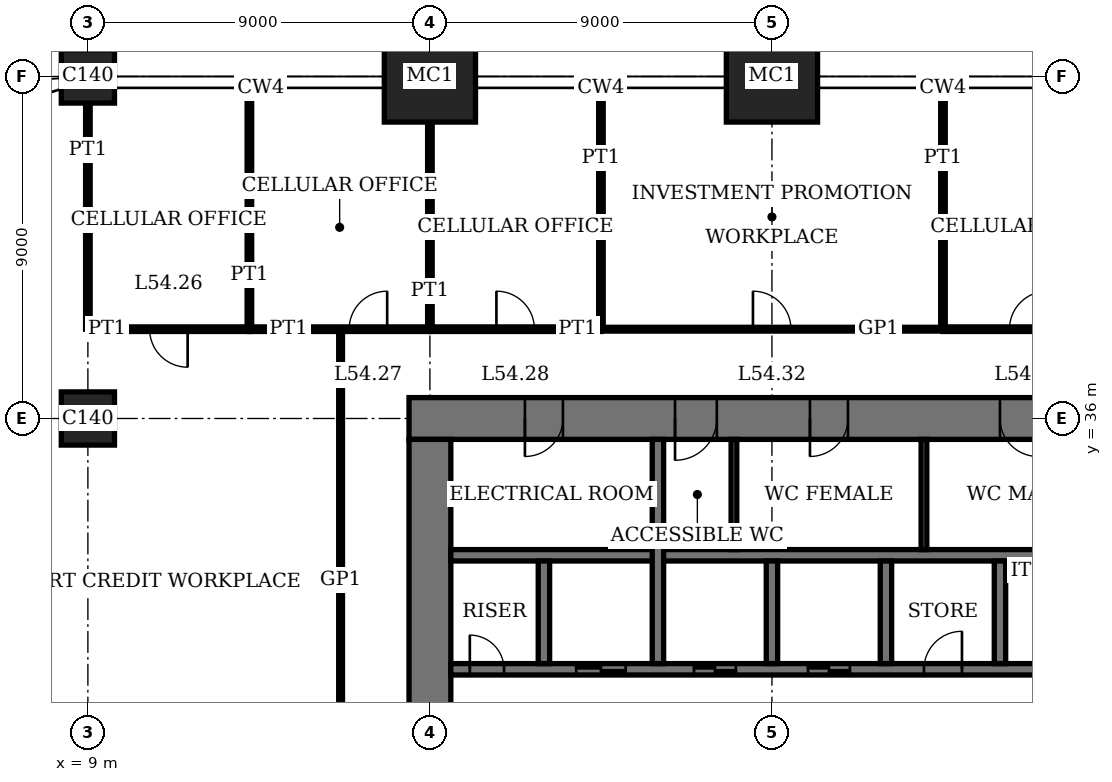
"""IFC4 building model, lengths in metres.
Left out: names, types, materials, properties, quantities, classifications, styles, units other than length and angle.
Written with IfcOpenShell. Run it as: python <this file> out.ifc"""

import sys

from ifc_helpers import new_model, si_unit, direction, frame, frame_2d, origin, origin_2d, place, context, subcontext, project, spatial, rectangle, extrude, element, fill, save


model = new_model("IFC4")
c1 = context("Model", 3, precision=1e-05, world=origin(), true_north=direction((0.0, 1.0)))
c2 = subcontext(c1, "Body", "Model", "MODEL_VIEW")
j1 = project(units=[si_unit("LENGTHUNIT", "METRE"), si_unit("PLANEANGLEUNIT", "RADIAN")], contexts=[c1])
p1 = place(None, origin())
s1 = spatial("IfcSite", under=j1, at=p1, CompositionType="ELEMENT")
p2 = place(p1, origin())
s2 = spatial("IfcBuilding", under=s1, at=p2, CompositionType="ELEMENT")
p3 = place(p2, frame((0.0, 0.0, 222.2)))
s3 = spatial("IfcBuildingStorey", under=s2, at=p3, CompositionType="ELEMENT", Elevation=222.2)
for number, where, z_axis, x_axis in (
    (1, (9.0, 36.0, 0.0), (0.0, 0.0, 1.0), (1.0, 0.0, 0.0)),
    (2, (9.0, 45.0, 0.0), (0.0, 0.0, 1.0), (1.0, 0.0, 0.0)),
):
    element("IfcColumn", number, at=place(p3, frame(where, z_axis=z_axis, x_axis=x_axis)), inside=s3, PredefinedType="COLUMN", context=c2, shape_type="SweptSolid", body=[
        extrude(rectangle(XDim=1.4, YDim=1.4, at=origin_2d()), origin(), (0.0, 0.0, 1.0), 4.0),
    ])
for number, where, z_axis, x_axis in (
    (3, (18.0, 45.0, 0.0), (0.0, 0.0, 1.0), (1.0, 0.0, 0.0)),
    (4, (27.0, 45.0, 0.0), (0.0, 0.0, 1.0), (1.0, 0.0, 0.0)),
):
    element("IfcColumn", number, at=place(p3, frame(where, z_axis=z_axis, x_axis=x_axis)), inside=s3, PredefinedType="COLUMN", context=c2, shape_type="SweptSolid", body=[
        extrude(rectangle(XDim=2.4, YDim=2.4, at=origin_2d()), origin(), (0.0, 0.0, 1.0), 4.0),
    ])
p4 = place(p3, frame((45.55, 36.0, 0.0), z_axis=(0.0, 0.0, 1.0), x_axis=(-1.0, 0.0, 0.0)))
e5 = element("IfcWall", 5, at=p4, inside=s3, PredefinedType="SHEAR", context=c2, shape_type="SweptSolid", body=[
    extrude(rectangle(XDim=28.1, YDim=1.1, at=frame_2d((14.05, 0.0))), origin(), (0.0, 0.0, 1.0), 4.0),
])
p5 = place(p4, frame((11.55, 0.0, 0.0)))
e6 = element("IfcOpeningElement", 6, at=p5, cuts=e5, PredefinedType="OPENING", context=c2, shape_type="SweptSolid", body=[
    extrude(rectangle(XDim=1.0, YDim=2.4, at=frame_2d((0.5, 1.2))), frame((0.0, 0.56, 0.0), z_axis=(0.0, -1.0, 0.0), x_axis=(1.0, 0.0, 0.0)), (0.0, 0.0, 1.0), 1.12),
])
p6 = place(p4, frame((16.55, 0.0, 0.0)))
e7 = element("IfcOpeningElement", 7, at=p6, cuts=e5, PredefinedType="OPENING", context=c2, shape_type="SweptSolid", body=[
    extrude(rectangle(XDim=1.0, YDim=2.4, at=frame_2d((0.5, 1.2))), frame((0.0, 0.56, 0.0), z_axis=(0.0, -1.0, 0.0), x_axis=(1.0, 0.0, 0.0)), (0.0, 0.0, 1.0), 1.12),
])
p7 = place(p4, frame((20.0, 0.0, 0.0)))
e8 = element("IfcOpeningElement", 8, at=p7, cuts=e5, PredefinedType="OPENING", context=c2, shape_type="SweptSolid", body=[
    extrude(rectangle(XDim=1.1, YDim=2.4, at=frame_2d((0.55, 1.2))), frame((0.0, 0.56, 0.0), z_axis=(0.0, -1.0, 0.0), x_axis=(1.0, 0.0, 0.0)), (0.0, 0.0, 1.0), 1.12),
])
p8 = place(p4, frame((24.05, 0.0, 0.0)))
e9 = element("IfcOpeningElement", 9, at=p8, cuts=e5, PredefinedType="OPENING", context=c2, shape_type="SweptSolid", body=[
    extrude(rectangle(XDim=1.0, YDim=2.4, at=frame_2d((0.5, 1.2))), frame((0.0, 0.56, 0.0), z_axis=(0.0, -1.0, 0.0), x_axis=(1.0, 0.0, 0.0)), (0.0, 0.0, 1.0), 1.12),
])
p9 = place(p3, frame((18.0, 35.45, 0.0), z_axis=(0.0, 0.0, 1.0), x_axis=(0.0, -1.0, 0.0)))
e10 = element("IfcWall", 10, at=p9, inside=s3, PredefinedType="SHEAR", context=c2, shape_type="SweptSolid", body=[
    extrude(rectangle(XDim=16.9, YDim=1.1, at=frame_2d((8.45, 0.0))), origin(), (0.0, 0.0, 1.0), 4.0),
])
p10 = place(p9, frame((8.45, 0.0, 0.0)))
e11 = element("IfcOpeningElement", 11, at=p10, cuts=e10, PredefinedType="OPENING", context=c2, shape_type="SweptSolid", body=[
    extrude(rectangle(XDim=1.8, YDim=2.4, at=frame_2d((0.9, 1.2))), frame((0.0, 0.56, 0.0), z_axis=(0.0, -1.0, 0.0), x_axis=(1.0, 0.0, 0.0)), (0.0, 0.0, 1.0), 1.12),
])
p11 = place(p3, frame((18.55, 29.4, 0.0), z_axis=(0.0, 0.0, 1.0), x_axis=(1.0, 0.0, 0.0)))
e12 = element("IfcWall", 12, at=p11, inside=s3, PredefinedType="SHEAR", context=c2, shape_type="SweptSolid", body=[
    extrude(rectangle(XDim=25.9, YDim=0.3, at=frame_2d((12.95, 0.0))), origin(), (0.0, 0.0, 1.0), 4.0),
])
p12 = place(p11, frame((19.95, 0.0, 0.0)))
e13 = element("IfcOpeningElement", 13, at=p12, cuts=e12, PredefinedType="OPENING", context=c2, shape_type="SweptSolid", body=[
    extrude(rectangle(XDim=1.0, YDim=2.4, at=frame_2d((0.5, 1.2))), frame((0.0, 0.16, 0.0), z_axis=(0.0, -1.0, 0.0), x_axis=(1.0, 0.0, 0.0)), (0.0, 0.0, 1.0), 0.32),
])
p13 = place(p11, frame((0.5, 0.0, 0.0)))
e14 = element("IfcOpeningElement", 14, at=p13, cuts=e12, PredefinedType="OPENING", context=c2, shape_type="SweptSolid", body=[
    extrude(rectangle(XDim=0.9, YDim=2.1, at=frame_2d((0.45, 1.05))), frame((0.0, 0.16, 0.0), z_axis=(0.0, -1.0, 0.0), x_axis=(1.0, 0.0, 0.0)), (0.0, 0.0, 1.0), 0.32),
])
p14 = place(p11, frame((15.45, 0.0, 0.0)))
e15 = element("IfcOpeningElement", 15, at=p14, cuts=e12, PredefinedType="OPENING", context=c2, shape_type="SweptSolid", body=[
    extrude(rectangle(XDim=1.0, YDim=2.4, at=frame_2d((0.5, 1.2))), frame((0.0, 0.16, 0.0), z_axis=(0.0, -1.0, 0.0), x_axis=(1.0, 0.0, 0.0)), (0.0, 0.0, 1.0), 0.32),
])
p15 = place(p11, frame((12.45, 0.0, 0.0)))
e16 = element("IfcOpeningElement", 16, at=p15, cuts=e12, PredefinedType="OPENING", context=c2, shape_type="SweptSolid", body=[
    extrude(rectangle(XDim=1.0, YDim=2.4, at=frame_2d((0.5, 1.2))), frame((0.0, 0.16, 0.0), z_axis=(0.0, -1.0, 0.0), x_axis=(1.0, 0.0, 0.0)), (0.0, 0.0, 1.0), 0.32),
])
p16 = place(p11, frame((9.4, 0.0, 0.0)))
e17 = element("IfcOpeningElement", 17, at=p16, cuts=e12, PredefinedType="OPENING", context=c2, shape_type="SweptSolid", body=[
    extrude(rectangle(XDim=1.1, YDim=2.4, at=frame_2d((0.55, 1.2))), frame((0.0, 0.16, 0.0), z_axis=(0.0, -1.0, 0.0), x_axis=(1.0, 0.0, 0.0)), (0.0, 0.0, 1.0), 0.32),
])
p17 = place(p11, frame((6.4, 0.0, 0.0)))
e18 = element("IfcOpeningElement", 18, at=p17, cuts=e12, PredefinedType="OPENING", context=c2, shape_type="SweptSolid", body=[
    extrude(rectangle(XDim=1.1, YDim=2.4, at=frame_2d((0.55, 1.2))), frame((0.0, 0.16, 0.0), z_axis=(0.0, -1.0, 0.0), x_axis=(1.0, 0.0, 0.0)), (0.0, 0.0, 1.0), 0.32),
])
p18 = place(p11, frame((3.3, 0.0, 0.0)))
e19 = element("IfcOpeningElement", 19, at=p18, cuts=e12, PredefinedType="OPENING", context=c2, shape_type="SweptSolid", body=[
    extrude(rectangle(XDim=1.3, YDim=2.4, at=frame_2d((0.65, 1.2))), frame((0.0, 0.16, 0.0), z_axis=(0.0, -1.0, 0.0), x_axis=(1.0, 0.0, 0.0)), (0.0, 0.0, 1.0), 0.32),
])
p19 = place(p3, frame((18.55, 32.4, 0.0), z_axis=(0.0, 0.0, 1.0), x_axis=(1.0, 0.0, 0.0)))
e20 = element("IfcWall", 20, at=p19, inside=s3, PredefinedType="SHEAR", context=c2, shape_type="SweptSolid", body=[
    extrude(rectangle(XDim=17.3, YDim=0.3, at=frame_2d((8.65, 0.0))), origin(), (0.0, 0.0, 1.0), 4.0),
])
for number, where, z_axis, x_axis in (
    (21, (33.0, 29.55, 0.0), (0.0, 0.0, 1.0), (0.0, 1.0, 0.0)),
    (22, (30.0, 29.55, 0.0), (0.0, 0.0, 1.0), (0.0, 1.0, 0.0)),
    (23, (27.0, 29.55, 0.0), (0.0, 0.0, 1.0), (0.0, 1.0, 0.0)),
):
    element("IfcWall", number, at=place(p3, frame(where, z_axis=z_axis, x_axis=x_axis)), inside=s3, PredefinedType="SHEAR", context=c2, shape_type="SweptSolid", body=[
        extrude(rectangle(XDim=2.7, YDim=0.3, at=frame_2d((1.35, 0.0))), origin(), (0.0, 0.0, 1.0), 4.0),
    ])
p20 = place(p3, frame((24.0, 29.55, 0.0), z_axis=(0.0, 0.0, 1.0), x_axis=(0.0, 1.0, 0.0)))
e24 = element("IfcWall", 24, at=p20, inside=s3, PredefinedType="SHEAR", context=c2, shape_type="SweptSolid", body=[
    extrude(rectangle(XDim=5.9, YDim=0.3, at=frame_2d((2.95, 0.0))), origin(), (0.0, 0.0, 1.0), 4.0),
])
p21 = place(p3, frame((21.0, 29.55, 0.0), z_axis=(0.0, 0.0, 1.0), x_axis=(0.0, 1.0, 0.0)))
e25 = element("IfcWall", 25, at=p21, inside=s3, PredefinedType="SHEAR", context=c2, shape_type="SweptSolid", body=[
    extrude(rectangle(XDim=2.7, YDim=0.3, at=frame_2d((1.35, 0.0))), origin(), (0.0, 0.0, 1.0), 4.0),
])
p22 = place(p3, frame((9.0, 38.35, 0.0), z_axis=(0.0, 0.0, 1.0), x_axis=(1.0, 0.0, 0.0)))
e26 = element("IfcWall", 26, at=p22, inside=s3, PredefinedType="PARTITIONING", context=c2, shape_type="SweptSolid", body=[
    extrude(rectangle(XDim=4.25, YDim=0.12, at=frame_2d((2.125, 0.0))), origin(), (0.0, 0.0, 1.0), 3.75),
])
p23 = place(p22, frame((1.625, 0.0, 0.0)))
e27 = element("IfcOpeningElement", 27, at=p23, cuts=e26, PredefinedType="OPENING", context=c2, shape_type="SweptSolid", body=[
    extrude(rectangle(XDim=1.0, YDim=2.4, at=frame_2d((0.5, 1.2))), frame((0.0, 0.07, 0.0), z_axis=(0.0, -1.0, 0.0), x_axis=(1.0, 0.0, 0.0)), (0.0, 0.0, 1.0), 0.14),
])
p24 = place(p3, frame((13.25, 38.35, 0.0), z_axis=(0.0, 0.0, 1.0), x_axis=(1.0, 0.0, 0.0)))
e28 = element("IfcWall", 28, at=p24, inside=s3, PredefinedType="PARTITIONING", context=c2, shape_type="SweptSolid", body=[
    extrude(rectangle(XDim=4.75, YDim=0.12, at=frame_2d((2.375, 0.0))), origin(), (0.0, 0.0, 1.0), 3.75),
])
p25 = place(p24, frame((2.625, 0.0, 0.0)))
e29 = element("IfcOpeningElement", 29, at=p25, cuts=e28, PredefinedType="OPENING", context=c2, shape_type="SweptSolid", body=[
    extrude(rectangle(XDim=1.0, YDim=2.4, at=frame_2d((0.5, 1.2))), frame((0.0, 0.07, 0.0), z_axis=(0.0, -1.0, 0.0), x_axis=(1.0, 0.0, 0.0)), (0.0, 0.0, 1.0), 0.14),
])
p26 = place(p3, frame((18.0, 38.35, 0.0), z_axis=(0.0, 0.0, 1.0), x_axis=(1.0, 0.0, 0.0)))
e30 = element("IfcWall", 30, at=p26, inside=s3, PredefinedType="PARTITIONING", context=c2, shape_type="SweptSolid", body=[
    extrude(rectangle(XDim=4.5, YDim=0.12, at=frame_2d((2.25, 0.0))), origin(), (0.0, 0.0, 1.0), 3.75),
])
p27 = place(p26, frame((1.75, 0.0, 0.0)))
e31 = element("IfcOpeningElement", 31, at=p27, cuts=e30, PredefinedType="OPENING", context=c2, shape_type="SweptSolid", body=[
    extrude(rectangle(XDim=1.0, YDim=2.4, at=frame_2d((0.5, 1.2))), frame((0.0, 0.07, 0.0), z_axis=(0.0, -1.0, 0.0), x_axis=(1.0, 0.0, 0.0)), (0.0, 0.0, 1.0), 0.14),
])
p28 = place(p3, frame((31.5, 38.35, 0.0), z_axis=(0.0, 0.0, 1.0), x_axis=(1.0, 0.0, 0.0)))
e32 = element("IfcWall", 32, at=p28, inside=s3, PredefinedType="PARTITIONING", context=c2, shape_type="SweptSolid", body=[
    extrude(rectangle(XDim=4.5, YDim=0.12, at=frame_2d((2.25, 0.0))), origin(), (0.0, 0.0, 1.0), 3.75),
])
p29 = place(p28, frame((1.75, 0.0, 0.0)))
e33 = element("IfcOpeningElement", 33, at=p29, cuts=e32, PredefinedType="OPENING", context=c2, shape_type="SweptSolid", body=[
    extrude(rectangle(XDim=1.0, YDim=2.4, at=frame_2d((0.5, 1.2))), frame((0.0, 0.07, 0.0), z_axis=(0.0, -1.0, 0.0), x_axis=(1.0, 0.0, 0.0)), (0.0, 0.0, 1.0), 0.14),
])
p30 = place(p3, frame((22.5, 38.35, 0.0), z_axis=(0.0, 0.0, 1.0), x_axis=(1.0, 0.0, 0.0)))
e34 = element("IfcWall", 34, at=p30, inside=s3, PredefinedType="PARTITIONING", context=c2, shape_type="SweptSolid", body=[
    extrude(rectangle(XDim=9.0, YDim=0.1, at=frame_2d((4.5, 0.0))), origin(), (0.0, 0.0, 1.0), 3.75),
])
p31 = place(p30, frame((4.0, 0.0, 0.0)))
e35 = element("IfcOpeningElement", 35, at=p31, cuts=e34, PredefinedType="OPENING", context=c2, shape_type="SweptSolid", body=[
    extrude(rectangle(XDim=1.0, YDim=2.4, at=frame_2d((0.5, 1.2))), frame((0.0, 0.06, 0.0), z_axis=(0.0, -1.0, 0.0), x_axis=(1.0, 0.0, 0.0)), (0.0, 0.0, 1.0), 0.12),
])
p32 = place(p3, frame((9.0, 38.35, 0.0), z_axis=(0.0, 0.0, 1.0), x_axis=(0.0, 1.0, 0.0)))
e36 = element("IfcWall", 36, at=p32, inside=s3, PredefinedType="PARTITIONING", context=c2, shape_type="SweptSolid", body=[
    extrude(rectangle(XDim=5.95, YDim=0.12, at=frame_2d((2.975, 0.0))), origin(), (0.0, 0.0, 1.0), 3.05),
])
p33 = place(p3, frame((13.25, 38.35, 0.0), z_axis=(0.0, 0.0, 1.0), x_axis=(0.0, 1.0, 0.0)))
e37 = element("IfcWall", 37, at=p33, inside=s3, PredefinedType="PARTITIONING", context=c2, shape_type="SweptSolid", body=[
    extrude(rectangle(XDim=6.34, YDim=0.12, at=frame_2d((3.17, 0.0))), origin(), (0.0, 0.0, 1.0), 3.75),
])
p34 = place(p3, frame((15.65, 27.0, 0.0), z_axis=(0.0, 0.0, 1.0), x_axis=(0.0, 1.0, 0.0)))
e38 = element("IfcWall", 38, at=p34, inside=s3, PredefinedType="PARTITIONING", context=c2, shape_type="SweptSolid", body=[
    extrude(rectangle(XDim=11.35, YDim=0.1, at=frame_2d((5.675, 0.0))), origin(), (0.0, 0.0, 1.0), 3.75),
])
p35 = place(p3, frame((18.0, 38.35, 0.0), z_axis=(0.0, 0.0, 1.0), x_axis=(0.0, 1.0, 0.0)))
e39 = element("IfcWall", 39, at=p35, inside=s3, PredefinedType="PARTITIONING", context=c2, shape_type="SweptSolid", body=[
    extrude(rectangle(XDim=5.45, YDim=0.12, at=frame_2d((2.725, 0.0))), origin(), (0.0, 0.0, 1.0), 3.05),
])
for number, where, z_axis, x_axis in (
    (40, (22.5, 38.35, 0.0), (0.0, 0.0, 1.0), (0.0, 1.0, 0.0)),
    (41, (31.5, 38.35, 0.0), (0.0, 0.0, 1.0), (0.0, 1.0, 0.0)),
):
    element("IfcWall", number, at=place(p3, frame(where, z_axis=z_axis, x_axis=x_axis)), inside=s3, PredefinedType="PARTITIONING", context=c2, shape_type="SweptSolid", body=[
        extrude(rectangle(XDim=6.34, YDim=0.12, at=frame_2d((3.17, 0.0))), origin(), (0.0, 0.0, 1.0), 3.75),
    ])
for number, where, z_axis, x_axis in (
    (42, (31.0, 32.55, 0.0), (0.0, 0.0, 1.0), (0.0, 1.0, 0.0)),
    (43, (26.0, 32.55, 0.0), (0.0, 0.0, 1.0), (0.0, 1.0, 0.0)),
):
    element("IfcWall", number, at=place(p3, frame(where, z_axis=z_axis, x_axis=x_axis)), inside=s3, PredefinedType="PARTITIONING", context=c2, shape_type="SweptSolid", body=[
        extrude(rectangle(XDim=2.9, YDim=0.15, at=frame_2d((1.45, 0.0))), origin(), (0.0, 0.0, 1.0), 3.75),
    ])
p36 = place(p5, origin())
e44 = element("IfcDoor", 44, at=p36, inside=s3, OperationType="SINGLE_SWING_RIGHT", PredefinedType="DOOR", context=c2, shape_type="SweptSolid", body=[
    extrude(rectangle(XDim=1.0, YDim=2.4, at=frame_2d((0.5, 1.2))), frame((0.0, 0.025, 0.0), z_axis=(0.0, -1.0, 0.0), x_axis=(1.0, 0.0, 0.0)), (0.0, 0.0, 1.0), 0.05),
    extrude(rectangle(XDim=0.04, YDim=2.4, at=frame_2d((0.02, 1.2))), frame((0.0, 0.4, 0.0), z_axis=(0.0, -1.0, 0.0), x_axis=(1.0, 0.0, 0.0)), (0.0, 0.0, 1.0), 0.8),
    extrude(rectangle(XDim=0.04, YDim=2.4, at=frame_2d((0.98, 1.2))), frame((0.0, 0.4, 0.0), z_axis=(0.0, -1.0, 0.0), x_axis=(1.0, 0.0, 0.0)), (0.0, 0.0, 1.0), 0.8),
    extrude(rectangle(XDim=1.0, YDim=0.04, at=frame_2d((0.5, 2.38))), frame((0.0, 0.4, 0.0), z_axis=(0.0, -1.0, 0.0), x_axis=(1.0, 0.0, 0.0)), (0.0, 0.0, 1.0), 0.8),
])
fill(e6, e44)
p37 = place(p6, origin())
e45 = element("IfcDoor", 45, at=p37, inside=s3, OperationType="SINGLE_SWING_LEFT", PredefinedType="DOOR", context=c2, shape_type="SweptSolid", body=[
    extrude(rectangle(XDim=1.0, YDim=2.4, at=frame_2d((0.5, 1.2))), frame((0.0, 0.025, 0.0), z_axis=(0.0, -1.0, 0.0), x_axis=(1.0, 0.0, 0.0)), (0.0, 0.0, 1.0), 0.05),
    extrude(rectangle(XDim=0.04, YDim=2.4, at=frame_2d((0.02, 1.2))), frame((0.0, 0.4, 0.0), z_axis=(0.0, -1.0, 0.0), x_axis=(1.0, 0.0, 0.0)), (0.0, 0.0, 1.0), 0.8),
    extrude(rectangle(XDim=0.04, YDim=2.4, at=frame_2d((0.98, 1.2))), frame((0.0, 0.4, 0.0), z_axis=(0.0, -1.0, 0.0), x_axis=(1.0, 0.0, 0.0)), (0.0, 0.0, 1.0), 0.8),
    extrude(rectangle(XDim=1.0, YDim=0.04, at=frame_2d((0.5, 2.38))), frame((0.0, 0.4, 0.0), z_axis=(0.0, -1.0, 0.0), x_axis=(1.0, 0.0, 0.0)), (0.0, 0.0, 1.0), 0.8),
])
fill(e7, e45)
p38 = place(p7, origin())
e46 = element("IfcDoor", 46, at=p38, inside=s3, OperationType="SINGLE_SWING_LEFT", PredefinedType="DOOR", context=c2, shape_type="SweptSolid", body=[
    extrude(rectangle(XDim=1.1, YDim=2.4, at=frame_2d((0.55, 1.2))), frame((0.0, 0.025, 0.0), z_axis=(0.0, -1.0, 0.0), x_axis=(1.0, 0.0, 0.0)), (0.0, 0.0, 1.0), 0.05),
    extrude(rectangle(XDim=0.04, YDim=2.4, at=frame_2d((0.02, 1.2))), frame((0.0, 0.44, 0.0), z_axis=(0.0, -1.0, 0.0), x_axis=(1.0, 0.0, 0.0)), (0.0, 0.0, 1.0), 0.88),
    extrude(rectangle(XDim=0.04, YDim=2.4, at=frame_2d((1.08, 1.2))), frame((0.0, 0.44, 0.0), z_axis=(0.0, -1.0, 0.0), x_axis=(1.0, 0.0, 0.0)), (0.0, 0.0, 1.0), 0.88),
    extrude(rectangle(XDim=1.1, YDim=0.04, at=frame_2d((0.55, 2.38))), frame((0.0, 0.44, 0.0), z_axis=(0.0, -1.0, 0.0), x_axis=(1.0, 0.0, 0.0)), (0.0, 0.0, 1.0), 0.88),
])
fill(e8, e46)
p39 = place(p8, origin())
e47 = element("IfcDoor", 47, at=p39, inside=s3, OperationType="SINGLE_SWING_LEFT", PredefinedType="DOOR", context=c2, shape_type="SweptSolid", body=[
    extrude(rectangle(XDim=1.0, YDim=2.4, at=frame_2d((0.5, 1.2))), frame((0.0, 0.025, 0.0), z_axis=(0.0, -1.0, 0.0), x_axis=(1.0, 0.0, 0.0)), (0.0, 0.0, 1.0), 0.05),
    extrude(rectangle(XDim=0.04, YDim=2.4, at=frame_2d((0.02, 1.2))), frame((0.0, 0.4, 0.0), z_axis=(0.0, -1.0, 0.0), x_axis=(1.0, 0.0, 0.0)), (0.0, 0.0, 1.0), 0.8),
    extrude(rectangle(XDim=0.04, YDim=2.4, at=frame_2d((0.98, 1.2))), frame((0.0, 0.4, 0.0), z_axis=(0.0, -1.0, 0.0), x_axis=(1.0, 0.0, 0.0)), (0.0, 0.0, 1.0), 0.8),
    extrude(rectangle(XDim=1.0, YDim=0.04, at=frame_2d((0.5, 2.38))), frame((0.0, 0.4, 0.0), z_axis=(0.0, -1.0, 0.0), x_axis=(1.0, 0.0, 0.0)), (0.0, 0.0, 1.0), 0.8),
])
fill(e9, e47)
p40 = place(p13, origin())
e48 = element("IfcDoor", 48, at=p40, inside=s3, OperationType="SINGLE_SWING_RIGHT", PredefinedType="DOOR", context=c2, shape_type="SweptSolid", body=[
    extrude(rectangle(XDim=0.9, YDim=2.1, at=frame_2d((0.45, 1.05))), frame((0.0, 0.03, 0.0), z_axis=(0.0, -1.0, 0.0), x_axis=(1.0, 0.0, 0.0)), (0.0, 0.0, 1.0), 0.06),
])
fill(e14, e48)
p41 = place(p23, origin())
e49 = element("IfcDoor", 49, at=p41, inside=s3, OperationType="SINGLE_SWING_RIGHT", PredefinedType="DOOR", context=c2, shape_type="SweptSolid", body=[
    extrude(rectangle(XDim=1.0, YDim=2.4, at=frame_2d((0.5, 1.2))), frame((0.0, 0.025, 0.0), z_axis=(0.0, -1.0, 0.0), x_axis=(1.0, 0.0, 0.0)), (0.0, 0.0, 1.0), 0.05),
])
fill(e27, e49)
p42 = place(p25, origin())
e50 = element("IfcDoor", 50, at=p42, inside=s3, OperationType="SINGLE_SWING_LEFT", PredefinedType="DOOR", context=c2, shape_type="SweptSolid", body=[
    extrude(rectangle(XDim=1.0, YDim=2.4, at=frame_2d((0.5, 1.2))), frame((0.0, 0.025, 0.0), z_axis=(0.0, -1.0, 0.0), x_axis=(1.0, 0.0, 0.0)), (0.0, 0.0, 1.0), 0.05),
])
fill(e29, e50)
p43 = place(p27, origin())
e51 = element("IfcDoor", 51, at=p43, inside=s3, OperationType="SINGLE_SWING_RIGHT", PredefinedType="DOOR", context=c2, shape_type="SweptSolid", body=[
    extrude(rectangle(XDim=1.0, YDim=2.4, at=frame_2d((0.5, 1.2))), frame((0.0, 0.025, 0.0), z_axis=(0.0, -1.0, 0.0), x_axis=(1.0, 0.0, 0.0)), (0.0, 0.0, 1.0), 0.05),
])
fill(e31, e51)
p44 = place(p29, origin())
e52 = element("IfcDoor", 52, at=p44, inside=s3, OperationType="SINGLE_SWING_LEFT", PredefinedType="DOOR", context=c2, shape_type="SweptSolid", body=[
    extrude(rectangle(XDim=1.0, YDim=2.4, at=frame_2d((0.5, 1.2))), frame((0.0, 0.025, 0.0), z_axis=(0.0, -1.0, 0.0), x_axis=(1.0, 0.0, 0.0)), (0.0, 0.0, 1.0), 0.05),
])
fill(e33, e52)
p45 = place(p31, origin())
e53 = element("IfcDoor", 53, at=p45, inside=s3, OperationType="SINGLE_SWING_RIGHT", PredefinedType="DOOR", context=c2, shape_type="SweptSolid", body=[
    extrude(rectangle(XDim=1.0, YDim=2.4, at=frame_2d((0.5, 1.2))), frame((0.0, 0.02, 0.0), z_axis=(0.0, -1.0, 0.0), x_axis=(1.0, 0.0, 0.0)), (0.0, 0.0, 1.0), 0.04),
])
fill(e35, e53)
p46 = place(p15, origin())
e54 = element("IfcDoor", 54, at=p46, inside=s3, OperationType="SINGLE_SWING_LEFT", PredefinedType="DOOR", context=c2, shape_type="SweptSolid", body=[
    extrude(rectangle(XDim=1.0, YDim=2.4, at=frame_2d((0.5, 1.2))), frame((0.0, 0.03, 0.0), z_axis=(0.0, -1.0, 0.0), x_axis=(1.0, 0.0, 0.0)), (0.0, 0.0, 1.0), 0.06),
])
fill(e16, e54)
p47 = place(p16, origin())
e55 = element("IfcDoor", 55, at=p47, inside=s3, OperationType="DOUBLE_DOOR_SLIDING", PredefinedType="DOOR", context=c2, shape_type="SweptSolid", body=[
    extrude(rectangle(XDim=1.1, YDim=2.4, at=frame_2d((0.55, 1.2))), frame((0.0, 0.02, 0.0), z_axis=(0.0, -1.0, 0.0), x_axis=(1.0, 0.0, 0.0)), (0.0, 0.0, 1.0), 0.04),
])
fill(e17, e55)
p48 = place(p17, origin())
e56 = element("IfcDoor", 56, at=p48, inside=s3, OperationType="DOUBLE_DOOR_SLIDING", PredefinedType="DOOR", context=c2, shape_type="SweptSolid", body=[
    extrude(rectangle(XDim=1.1, YDim=2.4, at=frame_2d((0.55, 1.2))), frame((0.0, 0.02, 0.0), z_axis=(0.0, -1.0, 0.0), x_axis=(1.0, 0.0, 0.0)), (0.0, 0.0, 1.0), 0.04),
])
fill(e18, e56)
p49 = place(p18, origin())
e57 = element("IfcDoor", 57, at=p49, inside=s3, OperationType="DOUBLE_DOOR_SLIDING", PredefinedType="DOOR", context=c2, shape_type="SweptSolid", body=[
    extrude(rectangle(XDim=1.3, YDim=2.4, at=frame_2d((0.65, 1.2))), frame((0.0, 0.02, 0.0), z_axis=(0.0, -1.0, 0.0), x_axis=(1.0, 0.0, 0.0)), (0.0, 0.0, 1.0), 0.04),
])
fill(e19, e57)
save(model, sys.argv[1])
